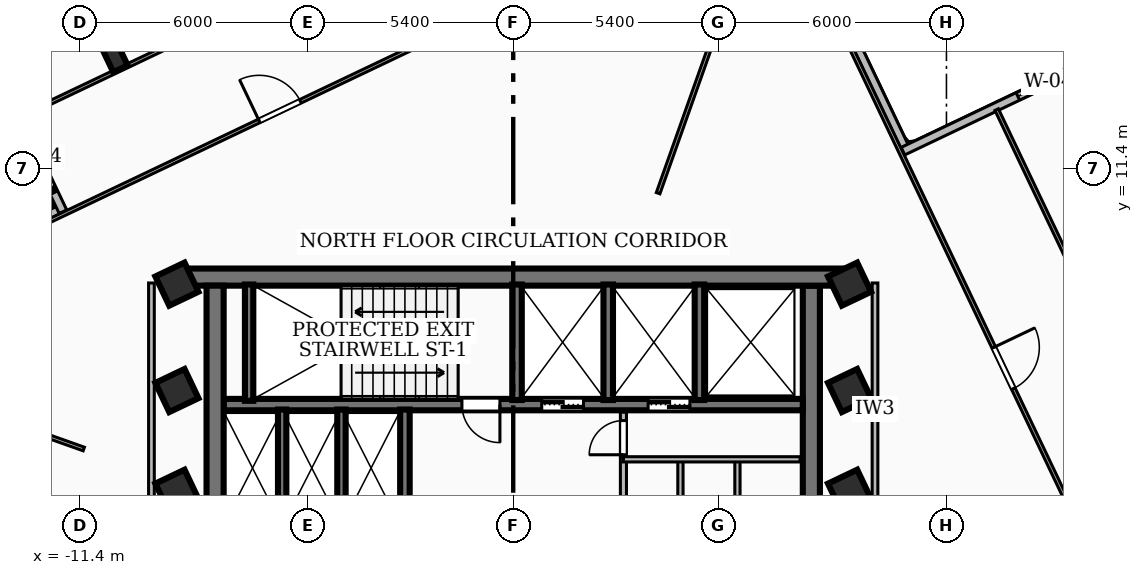
"""IFC4 building model, lengths in metres.
Left out: names, types, materials, properties, quantities, classifications, styles, units other than length and angle.
Written with IfcOpenShell. Run it as: python <this file> out.ifc"""

import sys

from ifc_helpers import new_model, si_unit, direction, frame, frame_2d, origin, origin_2d, place, context, subcontext, project, spatial, rectangle, i_section, extrude, element, fill, save


model = new_model("IFC4")
c1 = context("Model", 3, precision=1e-05, world=origin(), true_north=direction((0.0, 1.0)))
c2 = subcontext(c1, "Body", "Model", "MODEL_VIEW")
j1 = project(units=[si_unit("LENGTHUNIT", "METRE"), si_unit("PLANEANGLEUNIT", "RADIAN")], contexts=[c1])
p1 = place(None, origin())
s1 = spatial("IfcSite", under=j1, at=p1, CompositionType="ELEMENT")
p2 = place(p1, origin())
s2 = spatial("IfcBuilding", under=s1, at=p2, CompositionType="ELEMENT")
p3 = place(p2, frame((0.0, 0.0, 188.28)))
s3 = spatial("IfcBuildingStorey", under=s2, at=p3, CompositionType="ELEMENT", Elevation=188.28)
p4 = place(p3, frame((-8.78, 8.535, 0.0), z_axis=(0.0, 0.0, 1.0), x_axis=(1.0, 0.0, 0.0)))
e1 = element("IfcWall", 1, at=p4, inside=s3, PredefinedType="SHEAR", context=c2, shape_type="SweptSolid", body=[
    extrude(rectangle(XDim=17.56, YDim=0.45, at=frame_2d((8.78, 0.0))), origin(), (0.0, 0.0, 1.0), 4.06),
])
for number, where, z_axis, x_axis in (
    (2, (-7.845, 1.975, 0.0), (0.0, 0.0, 1.0), (0.0, 1.0, 0.0)),
    (3, (7.845, 8.31, 0.0), (0.0, 0.0, 1.0), (0.0, -1.0, 0.0)),
):
    element("IfcWall", number, at=place(p3, frame(where, z_axis=z_axis, x_axis=x_axis)), inside=s3, PredefinedType="SHEAR", context=c2, shape_type="SweptSolid", body=[
        extrude(rectangle(XDim=6.335, YDim=0.45, at=frame_2d((3.167, 0.0))), origin(), (0.0, 0.0, 1.0), 4.06),
    ])
p5 = place(p3, frame((7.62, 5.18, 0.0), z_axis=(0.0, 0.0, 1.0), x_axis=(-1.0, 0.0, 0.0)))
e4 = element("IfcWall", 4, at=p5, inside=s3, PredefinedType="SOLIDWALL", context=c2, shape_type="SweptSolid", body=[
    extrude(rectangle(XDim=15.24, YDim=0.3, at=frame_2d((7.62, 0.0))), origin(), (0.0, 0.0, 1.0), 4.06),
])
p6 = place(p5, frame((5.77, 0.0, 0.0)))
e5 = element("IfcOpeningElement", 5, at=p6, cuts=e4, PredefinedType="OPENING", context=c2, shape_type="SweptSolid", body=[
    extrude(rectangle(XDim=1.1, YDim=2.15, at=frame_2d((0.55, 1.075))), frame((0.0, 0.16, 0.0), z_axis=(0.0, -1.0, 0.0), x_axis=(1.0, 0.0, 0.0)), (0.0, 0.0, 1.0), 0.32),
])
p7 = place(p5, frame((2.97, 0.0, 0.0)))
e6 = element("IfcOpeningElement", 6, at=p7, cuts=e4, PredefinedType="OPENING", context=c2, shape_type="SweptSolid", body=[
    extrude(rectangle(XDim=1.1, YDim=2.15, at=frame_2d((0.55, 1.075))), frame((0.0, 0.16, 0.0), z_axis=(0.0, -1.0, 0.0), x_axis=(1.0, 0.0, 0.0)), (0.0, 0.0, 1.0), 0.32),
])
p8 = place(p5, frame((7.97, 0.0, 0.0)))
e7 = element("IfcOpeningElement", 7, at=p8, cuts=e4, PredefinedType="OPENING", context=c2, shape_type="SweptSolid", body=[
    extrude(rectangle(XDim=1.0, YDim=2.1, at=frame_2d((0.5, 1.05))), frame((0.0, 0.16, 0.0), z_axis=(0.0, -1.0, 0.0), x_axis=(1.0, 0.0, 0.0)), (0.0, 0.0, 1.0), 0.32),
])
p9 = place(p3, frame((-6.95, 5.28, 0.0), z_axis=(0.0, 0.0, 1.0), x_axis=(0.0, 1.0, 0.0)))
e8 = element("IfcWall", 8, at=p9, inside=s3, PredefinedType="SOLIDWALL", context=c2, shape_type="SweptSolid", body=[
    extrude(rectangle(XDim=3.06, YDim=0.22, at=frame_2d((1.53, 0.0))), origin(), (0.0, 0.0, 1.0), 4.06),
])
for number, where, z_axis, x_axis in (
    (9, (0.1, 5.3, 0.0), (0.0, 0.0, 1.0), (0.0, 1.0, 0.0)),
    (10, (2.5, 5.3, 0.0), (0.0, 0.0, 1.0), (0.0, 1.0, 0.0)),
    (11, (4.9, 5.3, 0.0), (0.0, 0.0, 1.0), (0.0, 1.0, 0.0)),
):
    element("IfcWall", number, at=place(p3, frame(where, z_axis=z_axis, x_axis=x_axis)), inside=s3, PredefinedType="SOLIDWALL", context=c2, shape_type="SweptSolid", body=[
        extrude(rectangle(XDim=3.04, YDim=0.25, at=frame_2d((1.52, 0.0))), origin(), (0.0, 0.0, 1.0), 4.06),
    ])
p10 = place(p3, frame((-2.85, 1.98, 0.0), z_axis=(0.0, 0.0, 1.0), x_axis=(0.0, 1.0, 0.0)))
e12 = element("IfcWall", 12, at=p10, inside=s3, PredefinedType="SOLIDWALL", context=c2, shape_type="SweptSolid", body=[
    extrude(rectangle(XDim=3.07, YDim=0.25, at=frame_2d((1.535, 0.0))), origin(), (0.0, 0.0, 1.0), 4.06),
])
for number, where, z_axis, x_axis in (
    (13, (-6.08, 1.98, 0.0), (0.0, 0.0, 1.0), (0.0, 1.0, 0.0)),
    (14, (-4.52, 1.98, 0.0), (0.0, 0.0, 1.0), (0.0, 1.0, 0.0)),
):
    element("IfcWall", number, at=place(p3, frame(where, z_axis=z_axis, x_axis=x_axis)), inside=s3, PredefinedType="SOLIDWALL", context=c2, shape_type="SweptSolid", body=[
        extrude(rectangle(XDim=3.07, YDim=0.22, at=frame_2d((1.535, 0.0))), origin(), (0.0, 0.0, 1.0), 4.06),
    ])
for number, where, z_axis, x_axis in (
    (15, (-8.85, 2.9, 0.0), (0.0, 0.0, 1.0), (0.903, 0.43, 0.0)),
    (16, (-8.85, 5.55, 0.0), (0.0, 0.0, 1.0), (0.903, 0.43, 0.0)),
    (17, (8.85, 2.9, 0.0), (0.0, 0.0, 1.0), (0.903, 0.43, 0.0)),
    (18, (8.85, 5.55, 0.0), (0.0, 0.0, 1.0), (0.903, 0.43, 0.0)),
    (19, (-8.85, 8.35, 0.0), (0.0, 0.0, 1.0), (0.903, 0.43, 0.0)),
    (20, (8.85, 8.35, 0.0), (0.0, 0.0, 1.0), (0.903, 0.43, 0.0)),
):
    element("IfcColumn", number, at=place(p3, frame(where, z_axis=z_axis, x_axis=x_axis)), inside=s3, PredefinedType="COLUMN", context=c2, shape_type="SweptSolid", body=[
        extrude(rectangle(XDim=0.85, YDim=0.85, at=origin_2d()), origin(), (0.0, 0.0, 1.0), 4.32),
    ])
p11 = place(p3, frame((-10.533, 14.433, 0.0), z_axis=(0.0, 0.0, 1.0), x_axis=(0.902885617815, 0.429880868547, 0.0)))
e21 = element("IfcColumn", 21, at=p11, inside=s3, PredefinedType="COLUMN", context=c2, shape_type="SweptSolid", body=[
    extrude(i_section(OverallWidth=0.418, OverallDepth=0.927, WebThickness=0.019, FlangeThickness=0.032, at=origin_2d()), origin(), (0.0, 0.0, 1.0), 4.32),
])
p12 = place(p3, frame((-17.91, 7.466, 0.0), z_axis=(0.0, 0.0, 1.0), x_axis=(0.902871867899, 0.429909746524, 0.0)))
e22 = element("IfcWall", 22, at=p12, inside=s3, PredefinedType="SOLIDWALL", context=c2, shape_type="SweptSolid", body=[
    extrude(rectangle(XDim=6.76, YDim=0.22, at=frame_2d((3.38, 0.0))), origin(), (0.0, 0.0, 1.0), 4.06),
])
p13 = place(p3, frame((-11.848, 10.255, 0.0), z_axis=(0.0, 0.0, 1.0), x_axis=(-0.429985218275, 0.902835927544, 0.0)))
e23 = element("IfcWall", 23, at=p13, inside=s3, PredefinedType="SOLIDWALL", context=c2, shape_type="SweptSolid", body=[
    extrude(rectangle(XDim=8.259, YDim=0.22, at=frame_2d((4.129, 0.0))), origin(), (0.0, 0.0, 1.0), 4.06),
])
p14 = place(p13, frame((0.85, 0.0, 0.85)))
e24 = element("IfcOpeningElement", 24, at=p14, cuts=e23, PredefinedType="OPENING", context=c2, shape_type="SweptSolid", body=[
    extrude(rectangle(XDim=1.5, YDim=1.5, at=frame_2d((0.75, 0.75))), frame((0.0, 0.12, 0.0), z_axis=(0.0, -1.0, 0.0), x_axis=(1.0, 0.0, 0.0)), (0.0, 0.0, 1.0), 0.24),
])
p15 = place(p3, frame((7.466, 17.91, 0.0), z_axis=(0.0, 0.0, 1.0), x_axis=(0.429909746524, -0.902871867899, 0.0)))
e25 = element("IfcWall", 25, at=p15, inside=s3, PredefinedType="SOLIDWALL", context=c2, shape_type="SweptSolid", body=[
    extrude(rectangle(XDim=6.76, YDim=0.22, at=frame_2d((3.38, 0.0))), origin(), (0.0, 0.0, 1.0), 4.06),
])
p16 = place(p3, frame((10.255, 11.848, 0.0), z_axis=(0.0, 0.0, 1.0), x_axis=(0.902845413107, 0.429965300962, 0.0)))
e26 = element("IfcWall", 26, at=p16, inside=s3, PredefinedType="SOLIDWALL", context=c2, shape_type="SweptSolid", body=[
    extrude(rectangle(XDim=9.859, YDim=0.22, at=frame_2d((4.929, 0.0))), origin(), (0.0, 0.0, 1.0), 4.06),
])
p17 = place(p16, frame((3.35, 0.0, 0.85)))
e27 = element("IfcOpeningElement", 27, at=p17, cuts=e26, PredefinedType="OPENING", context=c2, shape_type="SweptSolid", body=[
    extrude(rectangle(XDim=1.8, YDim=2.0, at=frame_2d((0.9, 1.0))), frame((0.0, 0.12, 0.0), z_axis=(0.0, -1.0, 0.0), x_axis=(1.0, 0.0, 0.0)), (0.0, 0.0, 1.0), 0.24),
])
p18 = place(p3, frame((2.9, 2.04, 0.0), z_axis=(0.0, 0.0, 1.0), x_axis=(0.0, 1.0, 0.0)))
e28 = element("IfcWall", 28, at=p18, inside=s3, PredefinedType="PARTITIONING", context=c2, shape_type="SweptSolid", body=[
    extrude(rectangle(XDim=2.94, YDim=0.16, at=frame_2d((1.47, 0.0))), origin(), (0.0, 0.0, 1.0), 3.29),
])
p19 = place(p18, frame((1.82, 0.0, 0.0)))
e29 = element("IfcOpeningElement", 29, at=p19, cuts=e28, PredefinedType="OPENING", context=c2, shape_type="SweptSolid", body=[
    extrude(rectangle(XDim=0.9, YDim=2.06, at=frame_2d((0.45, 1.03))), frame((0.0, 0.09, 0.0), z_axis=(0.0, -1.0, 0.0), x_axis=(1.0, 0.0, 0.0)), (0.0, 0.0, 1.0), 0.18),
])
p20 = place(p3, frame((2.9, 3.74, 0.0), z_axis=(0.0, 0.0, 1.0), x_axis=(1.0, 0.0, 0.0)))
e30 = element("IfcWall", 30, at=p20, inside=s3, PredefinedType="PARTITIONING", context=c2, shape_type="SweptSolid", body=[
    extrude(rectangle(XDim=4.65, YDim=0.138, at=frame_2d((2.325, 0.0))), origin(), (0.0, 0.0, 1.0), 4.06),
])
for number, where, z_axis, x_axis in (
    (31, (4.4, 1.85, 0.0), (0.0, 0.0, 1.0), (0.0, 1.0, 0.0)),
    (32, (5.9, 1.85, 0.0), (0.0, 0.0, 1.0), (0.0, 1.0, 0.0)),
):
    element("IfcWall", number, at=place(p3, frame(where, z_axis=z_axis, x_axis=x_axis)), inside=s3, PredefinedType="PARTITIONING", context=c2, shape_type="SweptSolid", body=[
        extrude(rectangle(XDim=1.89, YDim=0.138, at=frame_2d((0.945, 0.0))), origin(), (0.0, 0.0, 1.0), 3.29),
    ])
p21 = place(p3, frame((-9.52, 1.75, 0.0), z_axis=(0.0, 0.0, 1.0), x_axis=(0.0, 1.0, 0.0)))
e33 = element("IfcWall", 33, at=p21, inside=s3, PredefinedType="PARTITIONING", context=c2, shape_type="SweptSolid", body=[
    extrude(rectangle(XDim=6.63, YDim=0.15, at=frame_2d((3.315, 0.0))), origin(), (0.0, 0.0, 1.0), 4.06),
])
p22 = place(p3, frame((9.52, 1.75, 0.0), z_axis=(0.0, 0.0, 1.0), x_axis=(0.0, 1.0, 0.0)))
e34 = element("IfcWall", 34, at=p22, inside=s3, PredefinedType="PARTITIONING", context=c2, shape_type="SweptSolid", body=[
    extrude(rectangle(XDim=6.63, YDim=0.15, at=frame_2d((3.315, 0.0))), origin(), (0.0, 0.0, 1.0), 3.364),
])
p23 = place(p3, frame((3.813, 10.743, 0.0), z_axis=(0.0, 0.0, 1.0), x_axis=(0.334412381202, 0.942426845595, 0.0)))
e35 = element("IfcWall", 35, at=p23, inside=s3, PredefinedType="PARTITIONING", context=c2, shape_type="SweptSolid", body=[
    extrude(rectangle(XDim=8.274, YDim=0.1, at=frame_2d((4.137, 0.0))), origin(), (0.0, 0.0, 1.0), 4.06),
])
p24 = place(p3, frame((-11.3, 4.011, 0.0), z_axis=(0.0, 0.0, 1.0), x_axis=(-0.942439374513, 0.334377070636, 0.0)))
e36 = element("IfcWall", 36, at=p24, inside=s3, PredefinedType="PARTITIONING", context=c2, shape_type="SweptSolid", body=[
    extrude(rectangle(XDim=7.683, YDim=0.1, at=frame_2d((3.842, 0.0))), origin(), (0.0, 0.0, 1.0), 4.06),
])
p25 = place(p3, frame((8.362, 15.677, 0.0), z_axis=(0.0, 0.0, 1.0), x_axis=(0.429924831179, -0.902864685064, 0.0)))
e37 = element("IfcWall", 37, at=p25, inside=s3, PredefinedType="PARTITIONING", context=c2, shape_type="SweptSolid", body=[
    extrude(rectangle(XDim=20.58, YDim=0.1, at=frame_2d((10.29, 0.0))), origin(), (0.0, 0.0, 1.0), 3.364),
])
p26 = place(p25, frame((9.96, 0.0, 0.0)))
e38 = element("IfcOpeningElement", 38, at=p26, cuts=e37, PredefinedType="OPENING", context=c2, shape_type="SweptSolid", body=[
    extrude(rectangle(XDim=1.2, YDim=2.1, at=frame_2d((0.6, 1.05))), frame((0.0, 0.06, 0.0), z_axis=(0.0, -1.0, 0.0), x_axis=(1.0, 0.0, 0.0)), (0.0, 0.0, 1.0), 0.12),
])
p27 = place(p3, frame((12.722, 12.941, 0.0), z_axis=(0.0, 0.0, 1.0), x_axis=(0.429933580392, -0.902860518824, 0.0)))
e39 = element("IfcWall", 39, at=p27, inside=s3, PredefinedType="PARTITIONING", context=c2, shape_type="SweptSolid", body=[
    extrude(rectangle(XDim=12.97, YDim=0.1, at=frame_2d((6.485, 0.0))), origin(), (0.0, 0.0, 1.0), 3.364),
])
p28 = place(p27, frame((5.69, 0.0, 0.0)))
e40 = element("IfcOpeningElement", 40, at=p28, cuts=e39, PredefinedType="OPENING", context=c2, shape_type="SweptSolid", body=[
    extrude(rectangle(XDim=1.05, YDim=2.08, at=frame_2d((0.525, 1.04))), frame((0.0, 0.06, 0.0), z_axis=(0.0, -1.0, 0.0), x_axis=(1.0, 0.0, 0.0)), (0.0, 0.0, 1.0), 0.12),
])
p29 = place(p3, frame((-15.677, 8.362, 0.0), z_axis=(0.0, 0.0, 1.0), x_axis=(0.902864685064, 0.429924831179, 0.0)))
e41 = element("IfcWall", 41, at=p29, inside=s3, PredefinedType="PARTITIONING", context=c2, shape_type="SweptSolid", body=[
    extrude(rectangle(XDim=20.58, YDim=0.1, at=frame_2d((10.29, 0.0))), origin(), (0.0, 0.0, 1.0), 3.364),
])
p30 = place(p29, frame((9.96, 0.0, 0.0)))
e42 = element("IfcOpeningElement", 42, at=p30, cuts=e41, PredefinedType="OPENING", context=c2, shape_type="SweptSolid", body=[
    extrude(rectangle(XDim=1.2, YDim=2.1, at=frame_2d((0.6, 1.05))), frame((0.0, 0.06, 0.0), z_axis=(0.0, -1.0, 0.0), x_axis=(1.0, 0.0, 0.0)), (0.0, 0.0, 1.0), 0.12),
])
p31 = place(p3, frame((-12.958, 12.758, 0.0), z_axis=(0.0, 0.0, 1.0), x_axis=(0.902867825554, 0.429918235923, 0.0)))
e43 = element("IfcWall", 43, at=p31, inside=s3, PredefinedType="PARTITIONING", context=c2, shape_type="SweptSolid", body=[
    extrude(rectangle(XDim=12.97, YDim=0.1, at=frame_2d((6.485, 0.0))), origin(), (0.0, 0.0, 1.0), 3.364),
])
p32 = place(p31, frame((5.69, 0.0, 0.0)))
e44 = element("IfcOpeningElement", 44, at=p32, cuts=e43, PredefinedType="OPENING", context=c2, shape_type="SweptSolid", body=[
    extrude(rectangle(XDim=1.05, YDim=2.08, at=frame_2d((0.525, 1.04))), frame((0.0, 0.06, 0.0), z_axis=(0.0, -1.0, 0.0), x_axis=(1.0, 0.0, 0.0)), (0.0, 0.0, 1.0), 0.12),
])
p33 = place(p3, frame((-8.362, -15.677, 0.0), z_axis=(0.0, 0.0, 1.0), x_axis=(-0.429924831179, 0.902864685064, 0.0)))
e45 = element("IfcWall", 45, at=p33, inside=s3, PredefinedType="PARTITIONING", context=c2, shape_type="SweptSolid", body=[
    extrude(rectangle(XDim=20.58, YDim=0.1, at=frame_2d((10.29, 0.0))), origin(), (0.0, 0.0, 1.0), 3.364),
])
p34 = place(p33, frame((9.96, 0.0, 0.0)))
e46 = element("IfcOpeningElement", 46, at=p34, cuts=e45, PredefinedType="OPENING", context=c2, shape_type="SweptSolid", body=[
    extrude(rectangle(XDim=1.2, YDim=2.1, at=frame_2d((0.6, 1.05))), frame((0.0, 0.06, 0.0), z_axis=(0.0, -1.0, 0.0), x_axis=(1.0, 0.0, 0.0)), (0.0, 0.0, 1.0), 0.12),
])
p35 = place(p17, origin())
e47 = element("IfcWindow", 47, at=p35, inside=s3, PartitioningType="SINGLE_PANEL", PredefinedType="WINDOW", context=c2, shape_type="SweptSolid", body=[
    extrude(rectangle(XDim=1.8, YDim=2.0, at=frame_2d((0.9, 1.0))), frame((0.0, 0.03, 0.0), z_axis=(0.0, -1.0, 0.0), x_axis=(1.0, 0.0, 0.0)), (0.0, 0.0, 1.0), 0.06),
])
fill(e27, e47)
p36 = place(p6, origin())
e48 = element("IfcDoor", 48, at=p36, inside=s3, OperationType="DOUBLE_DOOR_SLIDING", PredefinedType="DOOR", context=c2, shape_type="SweptSolid", body=[
    extrude(rectangle(XDim=1.1, YDim=2.15, at=frame_2d((0.55, 1.075))), frame((0.0, 0.025, 0.0), z_axis=(0.0, -1.0, 0.0), x_axis=(1.0, 0.0, 0.0)), (0.0, 0.0, 1.0), 0.05),
])
fill(e5, e48)
p37 = place(p7, origin())
e49 = element("IfcDoor", 49, at=p37, inside=s3, OperationType="DOUBLE_DOOR_SLIDING", PredefinedType="DOOR", context=c2, shape_type="SweptSolid", body=[
    extrude(rectangle(XDim=1.1, YDim=2.15, at=frame_2d((0.55, 1.075))), frame((0.0, 0.025, 0.0), z_axis=(0.0, -1.0, 0.0), x_axis=(1.0, 0.0, 0.0)), (0.0, 0.0, 1.0), 0.05),
])
fill(e6, e49)
p38 = place(p8, origin())
e50 = element("IfcDoor", 50, at=p38, inside=s3, OperationType="SINGLE_SWING_LEFT", PredefinedType="DOOR", context=c2, shape_type="SweptSolid", body=[
    extrude(rectangle(XDim=1.0, YDim=2.1, at=frame_2d((0.5, 1.05))), frame((0.0, 0.025, 0.0), z_axis=(0.0, -1.0, 0.0), x_axis=(1.0, 0.0, 0.0)), (0.0, 0.0, 1.0), 0.05),
])
fill(e7, e50)
p39 = place(p19, origin())
e51 = element("IfcDoor", 51, at=p39, inside=s3, OperationType="SINGLE_SWING_LEFT", PredefinedType="DOOR", context=c2, shape_type="SweptSolid", body=[
    extrude(rectangle(XDim=0.9, YDim=2.06, at=frame_2d((0.45, 1.03))), frame((0.0, 0.025, 0.0), z_axis=(0.0, -1.0, 0.0), x_axis=(1.0, 0.0, 0.0)), (0.0, 0.0, 1.0), 0.05),
])
fill(e29, e51)
p40 = place(p26, origin())
e52 = element("IfcDoor", 52, at=p40, inside=s3, OperationType="SINGLE_SWING_LEFT", PredefinedType="DOOR", context=c2, shape_type="SweptSolid", body=[
    extrude(rectangle(XDim=1.2, YDim=2.1, at=frame_2d((0.6, 1.05))), frame((0.0, 0.025, 0.0), z_axis=(0.0, -1.0, 0.0), x_axis=(1.0, 0.0, 0.0)), (0.0, 0.0, 1.0), 0.05),
])
fill(e38, e52)
p41 = place(p30, origin())
e53 = element("IfcDoor", 53, at=p41, inside=s3, OperationType="SINGLE_SWING_LEFT", PredefinedType="DOOR", context=c2, shape_type="SweptSolid", body=[
    extrude(rectangle(XDim=1.2, YDim=2.1, at=frame_2d((0.6, 1.05))), frame((0.0, 0.025, 0.0), z_axis=(0.0, -1.0, 0.0), x_axis=(1.0, 0.0, 0.0)), (0.0, 0.0, 1.0), 0.05),
])
fill(e42, e53)
save(model, sys.argv[1])
